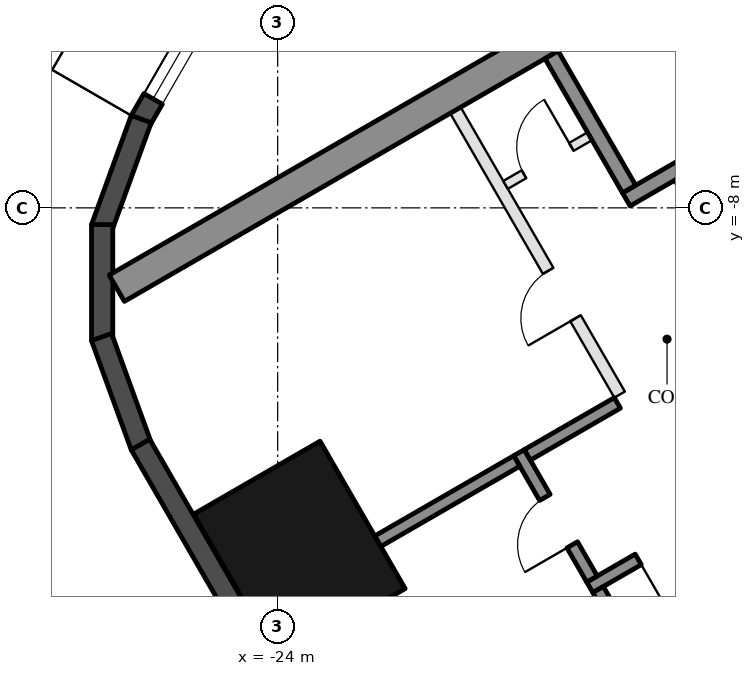
"""IFC4 building model, lengths in metres.
Left out: names, types, materials, properties, quantities, classifications, styles, units other than length and angle.
Written with IfcOpenShell. Run it as: python <this file> out.ifc"""

import sys

from ifc_helpers import new_model, si_unit, direction, frame, frame_2d, origin, origin_2d, place, context, subcontext, project, spatial, rectangle, hollow_rectangle, extrude, element, fill, save


model = new_model("IFC4")
c1 = context("Model", 3, precision=1e-05, world=origin(), true_north=direction((0.0, 1.0)))
c2 = subcontext(c1, "Body", "Model", "MODEL_VIEW")
j1 = project(units=[si_unit("LENGTHUNIT", "METRE"), si_unit("PLANEANGLEUNIT", "RADIAN")], contexts=[c1])
p1 = place(None, origin())
s1 = spatial("IfcSite", under=j1, at=p1, CompositionType="ELEMENT")
p2 = place(p1, origin())
s2 = spatial("IfcBuilding", under=s1, at=p2, CompositionType="ELEMENT")
p3 = place(p2, frame((0.0, 0.0, 113.1)))
s3 = spatial("IfcBuildingStorey", under=s2, at=p3, CompositionType="ELEMENT", Elevation=113.1)
p4 = place(p3, frame((-23.643, -13.65, 0.0), z_axis=(0.0, 0.0, 1.0), x_axis=(-0.5, 0.866025403784, 0.0)))
e1 = element("IfcColumn", 1, at=p4, inside=s3, PredefinedType="COLUMN", context=c2, shape_type="SweptSolid", body=[
    extrude(hollow_rectangle(XDim=2.8, YDim=2.4, WallThickness=0.07, at=origin_2d()), origin(), (0.0, 0.0, 1.0), 3.7),
])
p5 = place(p3, frame((-24.299, -3.176, 0.0), z_axis=(0.0, 0.0, 1.0), x_axis=(-0.500028278809, -0.866009076391, 0.0)))
e2 = element("IfcWall", 2, at=p5, inside=s3, PredefinedType="SOLIDWALL", context=c2, shape_type="SweptSolid", body=[
    extrude(rectangle(XDim=3.916, YDim=0.35, at=frame_2d((1.958, 0.0))), origin(), (0.0, 0.0, 1.0), 3.55),
])
p6 = place(p5, frame((1.7, 0.0, 0.3)))
e3 = element("IfcOpeningElement", 3, at=p6, cuts=e2, PredefinedType="OPENING", context=c2, shape_type="SweptSolid", body=[
    extrude(rectangle(XDim=1.8, YDim=2.65, at=frame_2d((0.9, 1.325))), frame((0.0, 0.185, 0.0), z_axis=(0.0, -1.0, 0.0), x_axis=(1.0, 0.0, 0.0)), (0.0, 0.0, 1.0), 0.37),
])
for number, where, z_axis, x_axis in (
    (4, (-26.244, -6.54, 0.0), (0.0, 0.0, 1.0), (-0.342, -0.94, 0.0)),
    (5, (-26.886, -8.275, 0.0), (0.0, 0.0, 1.0), (0.0, -1.0, 0.0)),
    (6, (-26.897, -10.125, 0.0), (0.0, 0.0, 1.0), (0.342, -0.94, 0.0)),
):
    element("IfcWall", number, at=place(p3, frame(where, z_axis=z_axis, x_axis=x_axis)), inside=s3, PredefinedType="SOLIDWALL", context=c2, shape_type="SweptSolid", body=[
        extrude(rectangle(XDim=1.91, YDim=0.35, at=frame_2d((0.955, 0.0))), origin(), (0.0, 0.0, 1.0), 3.55),
    ])
p7 = place(p3, frame((-26.257, -11.893, 0.0), z_axis=(0.0, 0.0, 1.0), x_axis=(0.500018773155, -0.866014564827, 0.0)))
e7 = element("IfcWall", 7, at=p7, inside=s3, PredefinedType="SOLIDWALL", context=c2, shape_type="SweptSolid", body=[
    extrude(rectangle(XDim=5.658, YDim=0.35, at=frame_2d((2.829, 0.0))), origin(), (0.0, 0.0, 1.0), 3.55),
])
for number, where, z_axis, x_axis in (
    (8, (-13.797, -1.903, 0.0), (0.0, 0.0, 1.0), (-0.866, -0.5, 0.0)),
    (9, (-8.547, -10.997, 0.0), (0.0, 0.0, 1.0), (-0.866, -0.5, 0.0)),
):
    element("IfcWall", number, at=place(p3, frame(where, z_axis=z_axis, x_axis=x_axis)), inside=s3, PredefinedType="SHEAR", context=c2, shape_type="SweptSolid", body=[
        extrude(rectangle(XDim=14.837, YDim=0.5, at=frame_2d((7.418, 0.0))), origin(), (0.0, 0.0, 1.0), 3.5),
    ])
p8 = place(p3, frame((-12.681, -4.636, 0.0), z_axis=(0.0, 0.0, 1.0), x_axis=(-0.866021702275, -0.500006411147, 0.0)))
e10 = element("IfcWall", 10, at=p8, inside=s3, PredefinedType="SHEAR", context=c2, shape_type="SweptSolid", body=[
    extrude(rectangle(XDim=6.45, YDim=0.25, at=frame_2d((3.225, 0.0))), origin(), (0.0, 0.0, 1.0), 3.5),
])
p9 = place(p8, frame((0.3, 0.0, 0.0)))
e11 = element("IfcOpeningElement", 11, at=p9, cuts=e10, PredefinedType="OPENING", context=c2, shape_type="SweptSolid", body=[
    extrude(rectangle(XDim=1.0, YDim=2.1, at=frame_2d((0.5, 1.05))), frame((0.0, 0.135, 0.0), z_axis=(0.0, -1.0, 0.0), x_axis=(1.0, 0.0, 0.0)), (0.0, 0.0, 1.0), 0.27),
])
p10 = place(p3, frame((-19.496, -5.482, 0.0), z_axis=(0.0, 0.0, 1.0), x_axis=(0.499990435942, -0.866030925526, 0.0)))
e12 = element("IfcWall", 12, at=p10, inside=s3, PredefinedType="SHEAR", context=c2, shape_type="SweptSolid", body=[
    extrude(rectangle(XDim=2.55, YDim=0.25, at=frame_2d((1.275, 0.0))), origin(), (0.0, 0.0, 1.0), 3.5),
])
p11 = place(p3, frame((-17.381, -7.495, 0.0), z_axis=(0.0, 0.0, 1.0), x_axis=(0.500011755427, -0.866018616679, 0.0)))
e13 = element("IfcWall", 13, at=p11, inside=s3, PredefinedType="SHEAR", context=c2, shape_type="SweptSolid", body=[
    extrude(rectangle(XDim=2.8, YDim=0.2, at=frame_2d((1.4, 0.0))), origin(), (0.0, 0.0, 1.0), 3.5),
])
p12 = place(p3, frame((-10.068, -9.162, 0.0), z_axis=(0.0, 0.0, 1.0), x_axis=(-0.866032725843, -0.499987317609, 0.0)))
e14 = element("IfcWall", 14, at=p12, inside=s3, PredefinedType="SHEAR", context=c2, shape_type="SweptSolid", body=[
    extrude(rectangle(XDim=10.16, YDim=0.2, at=frame_2d((5.08, 0.0))), origin(), (0.0, 0.0, 1.0), 3.5),
])
p13 = place(p12, frame((3.26, 0.0, 0.0)))
e15 = element("IfcOpeningElement", 15, at=p13, cuts=e14, PredefinedType="OPENING", context=c2, shape_type="SweptSolid", body=[
    extrude(rectangle(XDim=0.9, YDim=2.1, at=frame_2d((0.45, 1.05))), frame((0.0, 0.11, 0.0), z_axis=(0.0, -1.0, 0.0), x_axis=(1.0, 0.0, 0.0)), (0.0, 0.0, 1.0), 0.22),
])
p14 = place(p12, frame((8.34, 0.0, 0.0)))
e16 = element("IfcOpeningElement", 16, at=p14, cuts=e14, PredefinedType="OPENING", context=c2, shape_type="SweptSolid", body=[
    extrude(rectangle(XDim=0.9, YDim=2.1, at=frame_2d((0.45, 1.05))), frame((0.0, 0.11, 0.0), z_axis=(0.0, -1.0, 0.0), x_axis=(1.0, 0.0, 0.0)), (0.0, 0.0, 1.0), 0.22),
])
p15 = place(p3, frame((-20.031, -12.026, 0.0), z_axis=(0.0, 0.0, 1.0), x_axis=(0.500033551112, -0.866006032174, 0.0)))
e17 = element("IfcWall", 17, at=p15, inside=s3, PredefinedType="SHEAR", context=c2, shape_type="SweptSolid", body=[
    extrude(rectangle(XDim=2.4, YDim=0.2, at=frame_2d((1.2, 0.0))), origin(), (0.0, 0.0, 1.0), 3.5),
])
p16 = place(p15, frame((0.85, 0.0, 0.0)))
e18 = element("IfcOpeningElement", 18, at=p16, cuts=e17, PredefinedType="OPENING", context=c2, shape_type="SweptSolid", body=[
    extrude(rectangle(XDim=0.9, YDim=2.1, at=frame_2d((0.45, 1.05))), frame((0.0, 0.11, 0.0), z_axis=(0.0, -1.0, 0.0), x_axis=(1.0, 0.0, 0.0)), (0.0, 0.0, 1.0), 0.22),
])
p17 = place(p3, frame((-18.413, -11.208, 0.0), z_axis=(0.0, 0.0, 1.0), x_axis=(-0.866038183914, -0.499977863513, 0.0)))
e19 = element("IfcWall", 19, at=p17, inside=s3, PredefinedType="SHEAR", context=c2, shape_type="SweptSolid", body=[
    extrude(rectangle(XDim=1.71, YDim=0.2, at=frame_2d((0.855, 0.0))), origin(), (0.0, 0.0, 1.0), 3.5),
])
p18 = place(p3, frame((-18.73, -14.278, 0.0), z_axis=(0.0, 0.0, 1.0), x_axis=(0.50002537861, -0.866010750942, 0.0)))
e20 = element("IfcWall", 20, at=p18, inside=s3, PredefinedType="SHEAR", context=c2, shape_type="SweptSolid", body=[
    extrude(rectangle(XDim=2.0, YDim=0.2, at=frame_2d((1.0, 0.0))), origin(), (0.0, 0.0, 1.0), 3.5),
])
p19 = place(p3, frame((-20.067, -12.163, 0.0), z_axis=(0.0, 0.0, 1.0), x_axis=(-0.866060851709, -0.499938597367, 0.0)))
e21 = element("IfcWall", 21, at=p19, inside=s3, PredefinedType="SHEAR", context=c2, shape_type="SweptSolid", body=[
    extrude(rectangle(XDim=2.64, YDim=0.2, at=frame_2d((1.32, 0.0))), origin(), (0.0, 0.0, 1.0), 3.5),
])
p20 = place(p3, frame((-21.076, -6.395, 0.0), z_axis=(0.0, 0.0, 1.0), x_axis=(0.50001468107, -0.866016927499, 0.0)))
e22 = element("IfcWall", 22, at=p20, inside=s3, PredefinedType="PARTITIONING", context=c2, shape_type="SweptSolid", body=[
    extrude(rectangle(XDim=5.4, YDim=0.2, at=frame_2d((2.7, 0.0))), origin(), (0.0, 0.0, 1.0), 3.5),
])
p21 = place(p20, frame((3.05, 0.0, 0.0)))
e23 = element("IfcOpeningElement", 23, at=p21, cuts=e22, PredefinedType="OPENING", context=c2, shape_type="SweptSolid", body=[
    extrude(rectangle(XDim=0.9, YDim=2.1, at=frame_2d((0.45, 1.05))), frame((0.0, 0.11, 0.0), z_axis=(0.0, -1.0, 0.0), x_axis=(1.0, 0.0, 0.0)), (0.0, 0.0, 1.0), 0.22),
])
p22 = place(p3, frame((-18.866, -6.822, 0.0), z_axis=(0.0, 0.0, 1.0), x_axis=(-0.866028054938, -0.499995408039, 0.0)))
e24 = element("IfcWall", 24, at=p22, inside=s3, PredefinedType="PARTITIONING", context=c2, shape_type="SweptSolid", body=[
    extrude(rectangle(XDim=1.6, YDim=0.15, at=frame_2d((0.8, 0.0))), origin(), (0.0, 0.0, 1.0), 3.5),
])
p23 = place(p22, frame((0.35, 0.0, 0.0)))
e25 = element("IfcOpeningElement", 25, at=p23, cuts=e24, PredefinedType="OPENING", context=c2, shape_type="SweptSolid", body=[
    extrude(rectangle(XDim=0.9, YDim=2.1, at=frame_2d((0.45, 1.05))), frame((0.0, 0.085, 0.0), z_axis=(0.0, -1.0, 0.0), x_axis=(1.0, 0.0, 0.0)), (0.0, 0.0, 1.0), 0.17),
])
p24 = place(p6, origin())
e26 = element("IfcWindow", 26, at=p24, inside=s3, PartitioningType="SINGLE_PANEL", PredefinedType="WINDOW", context=c2, shape_type="SweptSolid", body=[
    extrude(rectangle(XDim=1.8, YDim=2.65, at=frame_2d((0.9, 1.325))), frame((0.0, 0.03, 0.0), z_axis=(0.0, -1.0, 0.0), x_axis=(1.0, 0.0, 0.0)), (0.0, 0.0, 1.0), 0.06),
])
fill(e3, e26)
p25 = place(p23, frame((0.9, 0.0, 0.0), z_axis=(0.0, 0.0, 1.0), x_axis=(-1.0, 0.0, 0.0)))
e27 = element("IfcDoor", 27, at=p25, inside=s3, OperationType="SINGLE_SWING_RIGHT", PredefinedType="DOOR", context=c2, shape_type="SweptSolid", body=[
    extrude(rectangle(XDim=0.9, YDim=2.1, at=frame_2d((0.45, 1.05))), frame((0.0, 0.025, 0.0), z_axis=(0.0, -1.0, 0.0), x_axis=(1.0, 0.0, 0.0)), (0.0, 0.0, 1.0), 0.05),
])
fill(e25, e27)
p26 = place(p14, origin())
e28 = element("IfcDoor", 28, at=p26, inside=s3, OperationType="SINGLE_SWING_RIGHT", PredefinedType="DOOR", context=c2, shape_type="SweptSolid", body=[
    extrude(rectangle(XDim=0.9, YDim=2.1, at=frame_2d((0.45, 1.05))), frame((0.0, 0.025, 0.0), z_axis=(0.0, -1.0, 0.0), x_axis=(1.0, 0.0, 0.0)), (0.0, 0.0, 1.0), 0.05),
])
fill(e16, e28)
p27 = place(p16, frame((0.9, 0.0, 0.0), z_axis=(0.0, 0.0, 1.0), x_axis=(-1.0, 0.0, 0.0)))
e29 = element("IfcDoor", 29, at=p27, inside=s3, OperationType="SINGLE_SWING_LEFT", PredefinedType="DOOR", context=c2, shape_type="SweptSolid", body=[
    extrude(rectangle(XDim=0.9, YDim=2.1, at=frame_2d((0.45, 1.05))), frame((0.0, 0.025, 0.0), z_axis=(0.0, -1.0, 0.0), x_axis=(1.0, 0.0, 0.0)), (0.0, 0.0, 1.0), 0.05),
])
fill(e18, e29)
p28 = place(p21, frame((0.9, 0.0, 0.0), z_axis=(0.0, 0.0, 1.0), x_axis=(-1.0, 0.0, 0.0)))
e30 = element("IfcDoor", 30, at=p28, inside=s3, OperationType="SINGLE_SWING_LEFT", PredefinedType="DOOR", context=c2, shape_type="SweptSolid", body=[
    extrude(rectangle(XDim=0.9, YDim=2.1, at=frame_2d((0.45, 1.05))), frame((0.0, 0.025, 0.0), z_axis=(0.0, -1.0, 0.0), x_axis=(1.0, 0.0, 0.0)), (0.0, 0.0, 1.0), 0.05),
])
fill(e23, e30)
save(model, sys.argv[1])
